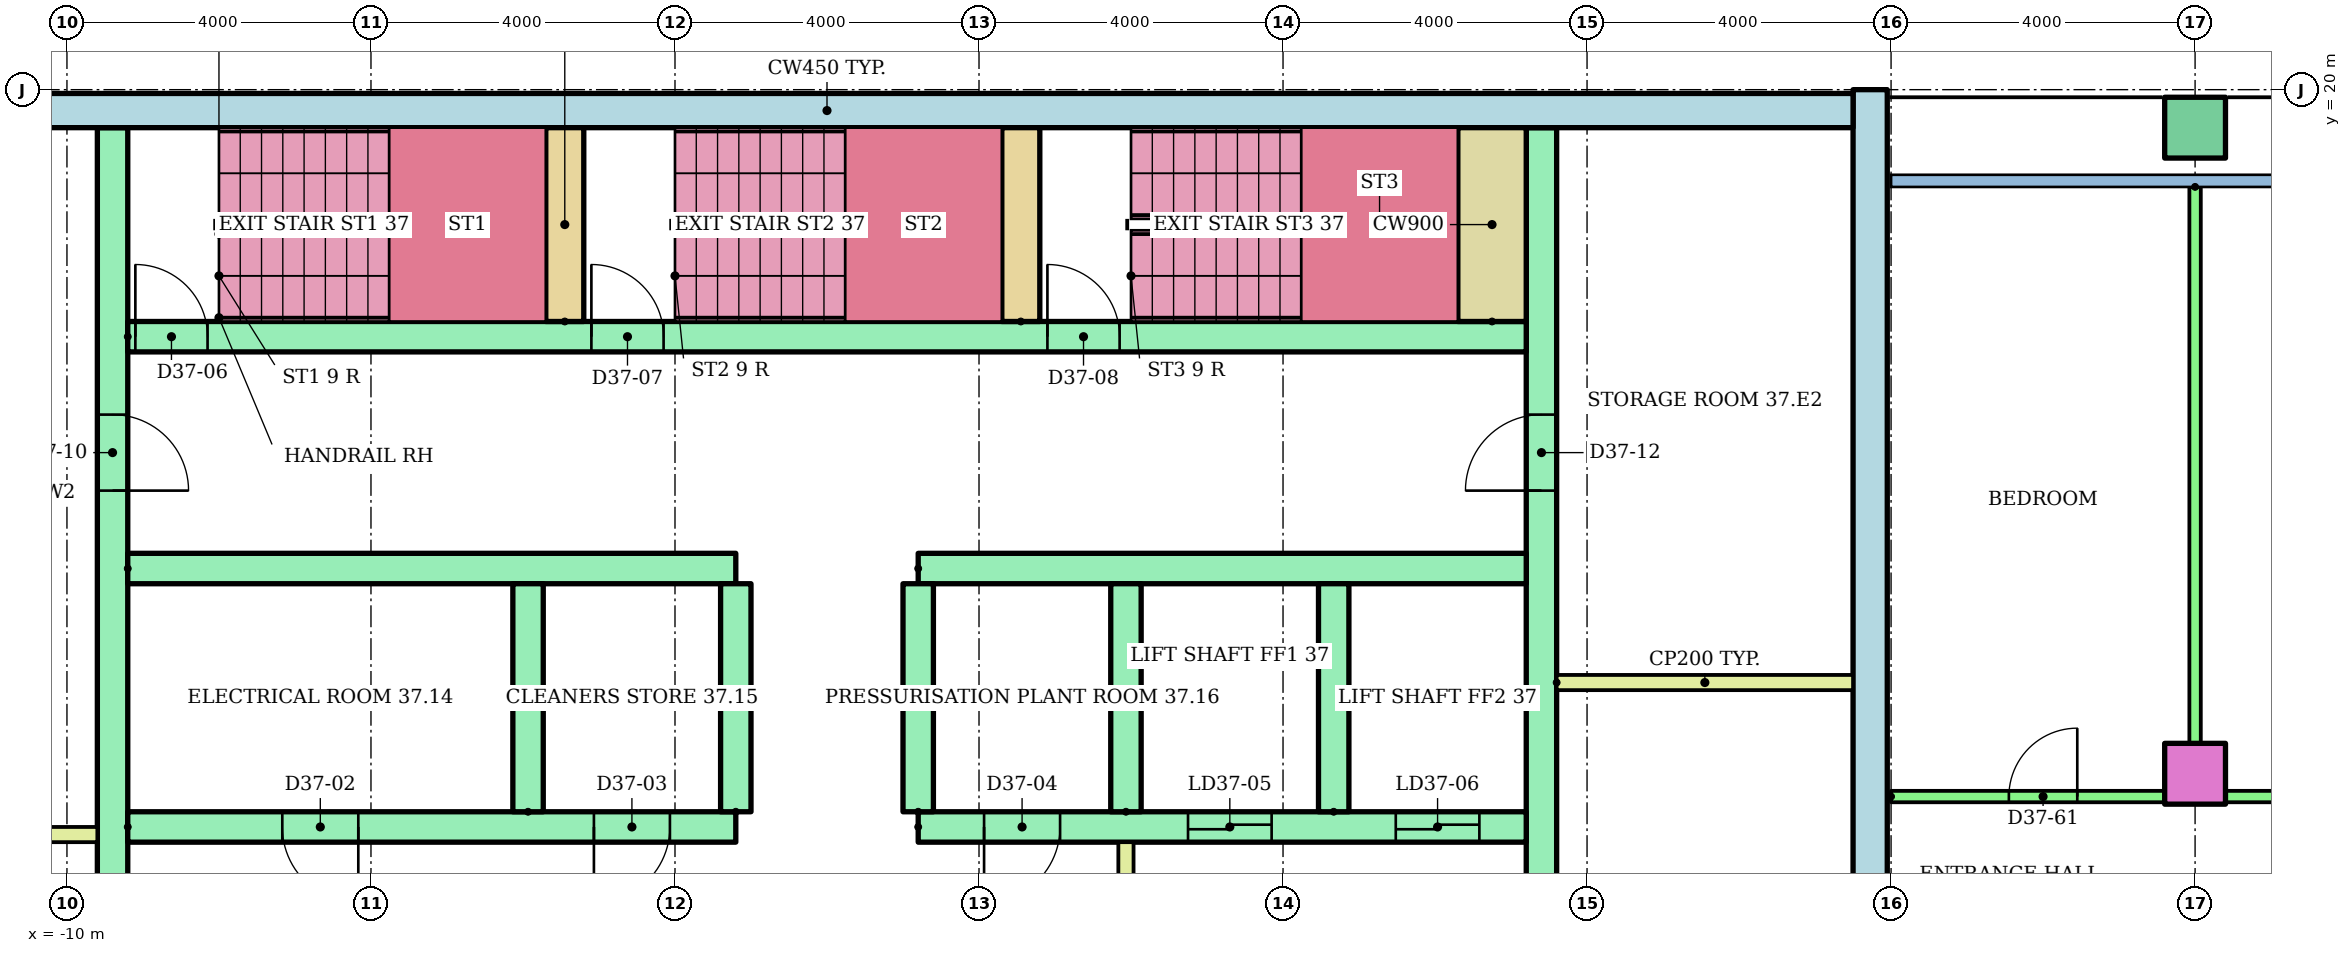
"""IFC4 building model, lengths in metres.
Left out: names, types, materials, properties, quantities, classifications, styles, units other than length and angle.
Written with IfcOpenShell. Run it as: python <this file> out.ifc"""

import sys

from ifc_helpers import new_model, si_unit, direction, frame, frame_2d, origin, origin_2d, place, context, subcontext, project, spatial, rectangle, hollow_rectangle, extrude, element, fill, save


model = new_model("IFC4")
c1 = context("Model", 3, precision=1e-05, world=origin(), true_north=direction((0.0, 1.0)))
c2 = subcontext(c1, "Body", "Model", "MODEL_VIEW")
j1 = project(units=[si_unit("LENGTHUNIT", "METRE"), si_unit("PLANEANGLEUNIT", "RADIAN")], contexts=[c1])
p1 = place(None, origin())
s1 = spatial("IfcSite", under=j1, at=p1, CompositionType="ELEMENT")
p2 = place(p1, origin())
s2 = spatial("IfcBuilding", under=s1, at=p2, CompositionType="ELEMENT")
p3 = place(p2, frame((0.0, 0.0, 142.2)))
s3 = spatial("IfcBuildingStorey", under=s2, at=p3, CompositionType="ELEMENT", Elevation=142.2)
p4 = place(p3, frame((18.0, 11.0, 0.0)))
e1 = element("IfcColumn", 1, at=p4, inside=s3, PredefinedType="COLUMN", context=c2, shape_type="SweptSolid", body=[
    extrude(rectangle(XDim=0.8, YDim=0.8, at=origin_2d()), origin(), (0.0, 0.0, 1.0), 3.2),
])
p5 = place(p3, frame((18.0, 19.5, 0.0)))
e2 = element("IfcColumn", 2, at=p5, inside=s3, PredefinedType="COLUMN", context=c2, shape_type="SweptSolid", body=[
    extrude(hollow_rectangle(XDim=0.8, YDim=0.8, WallThickness=0.04, at=origin_2d()), origin(), (0.0, 0.0, 1.0), 3.2),
])
p6 = place(p3, frame((13.725, 3.0, 0.0), z_axis=(0.0, 0.0, 1.0), x_axis=(0.0, 1.0, 0.0)))
e3 = element("IfcWall", 3, at=p6, inside=s3, PredefinedType="SHEAR", context=c2, shape_type="SweptSolid", body=[
    extrude(rectangle(XDim=17.0, YDim=0.45, at=frame_2d((8.5, 0.0))), origin(), (0.0, 0.0, 1.0), 2.92),
])
p7 = place(p3, frame((-13.5, 19.725, 0.0)))
e4 = element("IfcWall", 4, at=p7, inside=s3, PredefinedType="SHEAR", context=c2, shape_type="SweptSolid", body=[
    extrude(rectangle(XDim=27.0, YDim=0.45, at=frame_2d((13.5, 0.0))), origin(), (0.0, 0.0, 1.0), 2.92),
])
p8 = place(p3, frame((-9.4, 6.8, 0.0), z_axis=(0.0, 0.0, 1.0), x_axis=(0.0, 1.0, 0.0)))
e5 = element("IfcWall", 5, at=p8, inside=s3, PredefinedType="SHEAR", context=c2, shape_type="SweptSolid", body=[
    extrude(rectangle(XDim=12.7, YDim=0.4, at=frame_2d((6.35, 0.0))), origin(), (0.0, 0.0, 1.0), 2.92),
])
p9 = place(p8, frame((1.15, 0.0, 0.0)))
e6 = element("IfcOpeningElement", 6, at=p9, cuts=e5, PredefinedType="OPENING", context=c2, shape_type="SweptSolid", body=[
    extrude(rectangle(XDim=1.0, YDim=2.1, at=frame_2d((0.5, 1.05))), frame((0.0, 0.21, 0.0), z_axis=(0.0, -1.0, 0.0), x_axis=(1.0, 0.0, 0.0)), (0.0, 0.0, 1.0), 0.42),
])
p10 = place(p8, frame((7.925, 0.0, 0.0)))
e7 = element("IfcOpeningElement", 7, at=p10, cuts=e5, PredefinedType="OPENING", context=c2, shape_type="SweptSolid", body=[
    extrude(rectangle(XDim=1.0, YDim=2.1, at=frame_2d((0.5, 1.05))), frame((0.0, 0.21, 0.0), z_axis=(0.0, -1.0, 0.0), x_axis=(1.0, 0.0, 0.0)), (0.0, 0.0, 1.0), 0.42),
])
p11 = place(p3, frame((9.4, 6.8, 0.0), z_axis=(0.0, 0.0, 1.0), x_axis=(0.0, 1.0, 0.0)))
e8 = element("IfcWall", 8, at=p11, inside=s3, PredefinedType="SHEAR", context=c2, shape_type="SweptSolid", body=[
    extrude(rectangle(XDim=12.7, YDim=0.4, at=frame_2d((6.35, 0.0))), origin(), (0.0, 0.0, 1.0), 2.92),
])
p12 = place(p11, frame((1.15, 0.0, 0.0)))
e9 = element("IfcOpeningElement", 9, at=p12, cuts=e8, PredefinedType="OPENING", context=c2, shape_type="SweptSolid", body=[
    extrude(rectangle(XDim=1.0, YDim=2.1, at=frame_2d((0.5, 1.05))), frame((0.0, 0.21, 0.0), z_axis=(0.0, -1.0, 0.0), x_axis=(1.0, 0.0, 0.0)), (0.0, 0.0, 1.0), 0.42),
])
p13 = place(p11, frame((7.925, 0.0, 0.0)))
e10 = element("IfcOpeningElement", 10, at=p13, cuts=e8, PredefinedType="OPENING", context=c2, shape_type="SweptSolid", body=[
    extrude(rectangle(XDim=1.0, YDim=2.1, at=frame_2d((0.5, 1.05))), frame((0.0, 0.21, 0.0), z_axis=(0.0, -1.0, 0.0), x_axis=(1.0, 0.0, 0.0)), (0.0, 0.0, 1.0), 0.42),
])
p14 = place(p3, frame((-9.2, 10.3, 0.0)))
e11 = element("IfcWall", 11, at=p14, inside=s3, PredefinedType="SHEAR", context=c2, shape_type="SweptSolid", body=[
    extrude(rectangle(XDim=8.0, YDim=0.4, at=frame_2d((4.0, 0.0))), origin(), (0.0, 0.0, 1.0), 2.92),
])
p15 = place(p14, frame((2.033, 0.0, 0.0)))
e12 = element("IfcOpeningElement", 12, at=p15, cuts=e11, PredefinedType="OPENING", context=c2, shape_type="SweptSolid", body=[
    extrude(rectangle(XDim=1.0, YDim=2.1, at=frame_2d((0.5, 1.05))), frame((0.0, 0.21, 0.0), z_axis=(0.0, -1.0, 0.0), x_axis=(1.0, 0.0, 0.0)), (0.0, 0.0, 1.0), 0.42),
])
p16 = place(p14, frame((6.133, 0.0, 0.0)))
e13 = element("IfcOpeningElement", 13, at=p16, cuts=e11, PredefinedType="OPENING", context=c2, shape_type="SweptSolid", body=[
    extrude(rectangle(XDim=1.0, YDim=2.1, at=frame_2d((0.5, 1.05))), frame((0.0, 0.21, 0.0), z_axis=(0.0, -1.0, 0.0), x_axis=(1.0, 0.0, 0.0)), (0.0, 0.0, 1.0), 0.42),
])
p17 = place(p3, frame((-9.2, 13.7, 0.0)))
e14 = element("IfcWall", 14, at=p17, inside=s3, PredefinedType="SHEAR", context=c2, shape_type="SweptSolid", body=[
    extrude(rectangle(XDim=8.0, YDim=0.4, at=frame_2d((4.0, 0.0))), origin(), (0.0, 0.0, 1.0), 2.92),
])
p18 = place(p3, frame((1.2, 10.3, 0.0)))
e15 = element("IfcWall", 15, at=p18, inside=s3, PredefinedType="SHEAR", context=c2, shape_type="SweptSolid", body=[
    extrude(rectangle(XDim=8.0, YDim=0.4, at=frame_2d((4.0, 0.0))), origin(), (0.0, 0.0, 1.0), 2.92),
])
p19 = place(p18, frame((3.55, 0.0, 0.0)))
e16 = element("IfcOpeningElement", 16, at=p19, cuts=e15, PredefinedType="OPENING", context=c2, shape_type="SweptSolid", body=[
    extrude(rectangle(XDim=1.1, YDim=2.1, at=frame_2d((0.55, 1.05))), frame((0.0, 0.21, 0.0), z_axis=(0.0, -1.0, 0.0), x_axis=(1.0, 0.0, 0.0)), (0.0, 0.0, 1.0), 0.42),
])
p20 = place(p18, frame((6.283, 0.0, 0.0)))
e17 = element("IfcOpeningElement", 17, at=p20, cuts=e15, PredefinedType="OPENING", context=c2, shape_type="SweptSolid", body=[
    extrude(rectangle(XDim=1.1, YDim=2.1, at=frame_2d((0.55, 1.05))), frame((0.0, 0.21, 0.0), z_axis=(0.0, -1.0, 0.0), x_axis=(1.0, 0.0, 0.0)), (0.0, 0.0, 1.0), 0.42),
])
p21 = place(p18, frame((0.867, 0.0, 0.0)))
e18 = element("IfcOpeningElement", 18, at=p21, cuts=e15, PredefinedType="OPENING", context=c2, shape_type="SweptSolid", body=[
    extrude(rectangle(XDim=1.0, YDim=2.1, at=frame_2d((0.5, 1.05))), frame((0.0, 0.21, 0.0), z_axis=(0.0, -1.0, 0.0), x_axis=(1.0, 0.0, 0.0)), (0.0, 0.0, 1.0), 0.42),
])
p22 = place(p3, frame((1.2, 13.7, 0.0)))
e19 = element("IfcWall", 19, at=p22, inside=s3, PredefinedType="SHEAR", context=c2, shape_type="SweptSolid", body=[
    extrude(rectangle(XDim=8.0, YDim=0.4, at=frame_2d((4.0, 0.0))), origin(), (0.0, 0.0, 1.0), 2.92),
])
for number, where, z_axis, x_axis in (
    (20, (-3.933, 10.5, 0.0), (0.0, 0.0, 1.0), (0.0, 1.0, 0.0)),
    (21, (-1.2, 10.5, 0.0), (0.0, 0.0, 1.0), (0.0, 1.0, 0.0)),
    (22, (1.2, 10.5, 0.0), (0.0, 0.0, 1.0), (0.0, 1.0, 0.0)),
    (23, (3.933, 10.5, 0.0), (0.0, 0.0, 1.0), (0.0, 1.0, 0.0)),
    (24, (6.667, 10.5, 0.0), (0.0, 0.0, 1.0), (0.0, 1.0, 0.0)),
):
    element("IfcWall", number, at=place(p3, frame(where, z_axis=z_axis, x_axis=x_axis)), inside=s3, PredefinedType="SHEAR", context=c2, shape_type="SweptSolid", body=[
        extrude(rectangle(XDim=3.0, YDim=0.4, at=frame_2d((1.5, 0.0))), origin(), (0.0, 0.0, 1.0), 2.92),
    ])
p23 = place(p3, frame((3.933, 6.8, 0.0), z_axis=(0.0, 0.0, 1.0), x_axis=(0.0, 1.0, 0.0)))
e25 = element("IfcWall", 25, at=p23, inside=s3, PredefinedType="PARTITIONING", context=c2, shape_type="SweptSolid", body=[
    extrude(rectangle(XDim=3.3, YDim=0.2, at=frame_2d((1.65, 0.0))), origin(), (0.0, 0.0, 1.0), 2.92),
])
p24 = place(p23, frame((1.1, 0.0, 0.0)))
e26 = element("IfcOpeningElement", 26, at=p24, cuts=e25, PredefinedType="OPENING", context=c2, shape_type="SweptSolid", body=[
    extrude(rectangle(XDim=1.1, YDim=2.1, at=frame_2d((0.55, 1.05))), frame((0.0, 0.11, 0.0), z_axis=(0.0, -1.0, 0.0), x_axis=(1.0, 0.0, 0.0)), (0.0, 0.0, 1.0), 0.22),
])
p25 = place(p3, frame((-9.2, 16.75, 0.0)))
e27 = element("IfcWall", 27, at=p25, inside=s3, PredefinedType="SHEAR", context=c2, shape_type="SweptSolid", body=[
    extrude(rectangle(XDim=18.4, YDim=0.4, at=frame_2d((9.2, 0.0))), origin(), (0.0, 0.0, 1.0), 2.92),
])
p26 = place(p25, frame((0.1, 0.0, 0.0)))
e28 = element("IfcOpeningElement", 28, at=p26, cuts=e27, PredefinedType="OPENING", context=c2, shape_type="SweptSolid", body=[
    extrude(rectangle(XDim=0.95, YDim=2.1, at=frame_2d((0.475, 1.05))), frame((0.0, 0.21, 0.0), z_axis=(0.0, -1.0, 0.0), x_axis=(1.0, 0.0, 0.0)), (0.0, 0.0, 1.0), 0.42),
])
p27 = place(p25, frame((6.1, 0.0, 0.0)))
e29 = element("IfcOpeningElement", 29, at=p27, cuts=e27, PredefinedType="OPENING", context=c2, shape_type="SweptSolid", body=[
    extrude(rectangle(XDim=0.95, YDim=2.1, at=frame_2d((0.475, 1.05))), frame((0.0, 0.21, 0.0), z_axis=(0.0, -1.0, 0.0), x_axis=(1.0, 0.0, 0.0)), (0.0, 0.0, 1.0), 0.42),
])
p28 = place(p25, frame((12.1, 0.0, 0.0)))
e30 = element("IfcOpeningElement", 30, at=p28, cuts=e27, PredefinedType="OPENING", context=c2, shape_type="SweptSolid", body=[
    extrude(rectangle(XDim=0.95, YDim=2.1, at=frame_2d((0.475, 1.05))), frame((0.0, 0.21, 0.0), z_axis=(0.0, -1.0, 0.0), x_axis=(1.0, 0.0, 0.0)), (0.0, 0.0, 1.0), 0.42),
])
for number, where, z_axis, x_axis in (
    (31, (-3.45, 16.95, 0.0), (0.0, 0.0, 1.0), (0.0, 1.0, 0.0)),
    (32, (2.55, 16.95, 0.0), (0.0, 0.0, 1.0), (0.0, 1.0, 0.0)),
):
    element("IfcWall", number, at=place(p3, frame(where, z_axis=z_axis, x_axis=x_axis)), inside=s3, PredefinedType="SHEAR", context=c2, shape_type="SweptSolid", body=[
        extrude(rectangle(XDim=2.55, YDim=0.5, at=frame_2d((1.275, 0.0))), origin(), (0.0, 0.0, 1.0), 2.92),
    ])
p29 = place(p3, frame((8.75, 16.95, 0.0), z_axis=(0.0, 0.0, 1.0), x_axis=(0.0, 1.0, 0.0)))
e33 = element("IfcWall", 33, at=p29, inside=s3, PredefinedType="SHEAR", context=c2, shape_type="SweptSolid", body=[
    extrude(rectangle(XDim=2.55, YDim=0.9, at=frame_2d((1.275, 0.0))), origin(), (0.0, 0.0, 1.0), 2.92),
])
for number, where in (
    (34, (-13.5, 10.2, 0.0)),
    (35, (9.6, 12.2, 0.0)),
):
    element("IfcWall", number, at=place(p3, frame(where)), inside=s3, PredefinedType="PARTITIONING", context=c2, shape_type="SweptSolid", body=[
        extrude(rectangle(XDim=3.9, YDim=0.2, at=frame_2d((1.95, 0.0))), origin(), (0.0, 0.0, 1.0), 2.92),
    ])
p30 = place(p3, frame((14.0, 10.7, 0.0)))
e36 = element("IfcWall", 36, at=p30, inside=s3, PredefinedType="PARTITIONING", context=c2, shape_type="SweptSolid", body=[
    extrude(rectangle(XDim=18.71, YDim=0.15, at=frame_2d((9.355, 0.0))), origin(), (0.0, 0.0, 1.0), 2.4),
])
p31 = place(p30, frame((1.55, 0.0, 0.0)))
e37 = element("IfcOpeningElement", 37, at=p31, cuts=e36, PredefinedType="OPENING", context=c2, shape_type="SweptSolid", body=[
    extrude(rectangle(XDim=0.9, YDim=2.1, at=frame_2d((0.45, 1.05))), frame((0.0, 0.085, 0.0), z_axis=(0.0, -1.0, 0.0), x_axis=(1.0, 0.0, 0.0)), (0.0, 0.0, 1.0), 0.17),
])
p32 = place(p30, frame((10.382, 0.0, 0.0)))
e38 = element("IfcOpeningElement", 38, at=p32, cuts=e36, PredefinedType="OPENING", context=c2, shape_type="SweptSolid", body=[
    extrude(rectangle(XDim=1.0, YDim=2.1, at=frame_2d((0.5, 1.05))), frame((0.0, 0.085, 0.0), z_axis=(0.0, -1.0, 0.0), x_axis=(1.0, 0.0, 0.0)), (0.0, 0.0, 1.0), 0.17),
])
p33 = place(p3, frame((18.0, 18.721, 0.0), z_axis=(0.0, 0.0, 1.0), x_axis=(0.0, -1.0, 0.0)))
e39 = element("IfcWall", 39, at=p33, inside=s3, PredefinedType="PARTITIONING", context=c2, shape_type="SweptSolid", body=[
    extrude(rectangle(XDim=8.021, YDim=0.15, at=frame_2d((4.01, 0.0))), origin(), (0.0, 0.0, 1.0), 2.4),
])
p34 = place(p19, origin())
e40 = element("IfcDoor", 40, at=p34, inside=s3, OperationType="SLIDING_TO_LEFT", PredefinedType="DOOR", context=c2, shape_type="SweptSolid", body=[
    extrude(rectangle(XDim=1.1, YDim=2.1, at=frame_2d((0.55, 1.05))), frame((0.0, 0.025, 0.0), z_axis=(0.0, -1.0, 0.0), x_axis=(1.0, 0.0, 0.0)), (0.0, 0.0, 1.0), 0.05),
])
fill(e16, e40)
p35 = place(p20, origin())
e41 = element("IfcDoor", 41, at=p35, inside=s3, OperationType="SLIDING_TO_LEFT", PredefinedType="DOOR", context=c2, shape_type="SweptSolid", body=[
    extrude(rectangle(XDim=1.1, YDim=2.1, at=frame_2d((0.55, 1.05))), frame((0.0, 0.025, 0.0), z_axis=(0.0, -1.0, 0.0), x_axis=(1.0, 0.0, 0.0)), (0.0, 0.0, 1.0), 0.05),
])
fill(e17, e41)
p36 = place(p15, frame((1.0, 0.0, 0.0), z_axis=(0.0, 0.0, 1.0), x_axis=(-1.0, 0.0, 0.0)))
e42 = element("IfcDoor", 42, at=p36, inside=s3, OperationType="SINGLE_SWING_RIGHT", PredefinedType="DOOR", context=c2, shape_type="SweptSolid", body=[
    extrude(rectangle(XDim=1.0, YDim=2.1, at=frame_2d((0.5, 1.05))), frame((0.0, 0.025, 0.0), z_axis=(0.0, -1.0, 0.0), x_axis=(1.0, 0.0, 0.0)), (0.0, 0.0, 1.0), 0.05),
])
fill(e12, e42)
p37 = place(p16, frame((1.0, 0.0, 0.0), z_axis=(0.0, 0.0, 1.0), x_axis=(-1.0, 0.0, 0.0)))
e43 = element("IfcDoor", 43, at=p37, inside=s3, OperationType="SINGLE_SWING_LEFT", PredefinedType="DOOR", context=c2, shape_type="SweptSolid", body=[
    extrude(rectangle(XDim=1.0, YDim=2.1, at=frame_2d((0.5, 1.05))), frame((0.0, 0.025, 0.0), z_axis=(0.0, -1.0, 0.0), x_axis=(1.0, 0.0, 0.0)), (0.0, 0.0, 1.0), 0.05),
])
fill(e13, e43)
p38 = place(p21, frame((1.0, 0.0, 0.0), z_axis=(0.0, 0.0, 1.0), x_axis=(-1.0, 0.0, 0.0)))
e44 = element("IfcDoor", 44, at=p38, inside=s3, OperationType="SINGLE_SWING_LEFT", PredefinedType="DOOR", context=c2, shape_type="SweptSolid", body=[
    extrude(rectangle(XDim=1.0, YDim=2.1, at=frame_2d((0.5, 1.05))), frame((0.0, 0.025, 0.0), z_axis=(0.0, -1.0, 0.0), x_axis=(1.0, 0.0, 0.0)), (0.0, 0.0, 1.0), 0.05),
])
fill(e18, e44)
p39 = place(p26, origin())
e45 = element("IfcDoor", 45, at=p39, inside=s3, OperationType="SINGLE_SWING_LEFT", PredefinedType="DOOR", context=c2, shape_type="SweptSolid", body=[
    extrude(rectangle(XDim=0.95, YDim=2.1, at=frame_2d((0.475, 1.05))), frame((0.0, 0.025, 0.0), z_axis=(0.0, -1.0, 0.0), x_axis=(1.0, 0.0, 0.0)), (0.0, 0.0, 1.0), 0.05),
])
fill(e28, e45)
p40 = place(p27, origin())
e46 = element("IfcDoor", 46, at=p40, inside=s3, OperationType="SINGLE_SWING_LEFT", PredefinedType="DOOR", context=c2, shape_type="SweptSolid", body=[
    extrude(rectangle(XDim=0.95, YDim=2.1, at=frame_2d((0.475, 1.05))), frame((0.0, 0.025, 0.0), z_axis=(0.0, -1.0, 0.0), x_axis=(1.0, 0.0, 0.0)), (0.0, 0.0, 1.0), 0.05),
])
fill(e29, e46)
p41 = place(p28, origin())
e47 = element("IfcDoor", 47, at=p41, inside=s3, OperationType="SINGLE_SWING_LEFT", PredefinedType="DOOR", context=c2, shape_type="SweptSolid", body=[
    extrude(rectangle(XDim=0.95, YDim=2.1, at=frame_2d((0.475, 1.05))), frame((0.0, 0.025, 0.0), z_axis=(0.0, -1.0, 0.0), x_axis=(1.0, 0.0, 0.0)), (0.0, 0.0, 1.0), 0.05),
])
fill(e30, e47)
p42 = place(p10, frame((1.0, 0.0, 0.0), z_axis=(0.0, 0.0, 1.0), x_axis=(-1.0, 0.0, 0.0)))
e48 = element("IfcDoor", 48, at=p42, inside=s3, OperationType="SINGLE_SWING_LEFT", PredefinedType="DOOR", context=c2, shape_type="SweptSolid", body=[
    extrude(rectangle(XDim=1.0, YDim=2.1, at=frame_2d((0.5, 1.05))), frame((0.0, 0.025, 0.0), z_axis=(0.0, -1.0, 0.0), x_axis=(1.0, 0.0, 0.0)), (0.0, 0.0, 1.0), 0.05),
])
fill(e7, e48)
p43 = place(p13, origin())
e49 = element("IfcDoor", 49, at=p43, inside=s3, OperationType="SINGLE_SWING_LEFT", PredefinedType="DOOR", context=c2, shape_type="SweptSolid", body=[
    extrude(rectangle(XDim=1.0, YDim=2.1, at=frame_2d((0.5, 1.05))), frame((0.0, 0.025, 0.0), z_axis=(0.0, -1.0, 0.0), x_axis=(1.0, 0.0, 0.0)), (0.0, 0.0, 1.0), 0.05),
])
fill(e10, e49)
p44 = place(p31, origin())
e50 = element("IfcDoor", 50, at=p44, inside=s3, OperationType="SINGLE_SWING_RIGHT", PredefinedType="DOOR", context=c2, shape_type="SweptSolid", body=[
    extrude(rectangle(XDim=0.9, YDim=2.1, at=frame_2d((0.45, 1.05))), frame((0.0, 0.025, 0.0), z_axis=(0.0, -1.0, 0.0), x_axis=(1.0, 0.0, 0.0)), (0.0, 0.0, 1.0), 0.05),
])
fill(e37, e50)
save(model, sys.argv[1])
